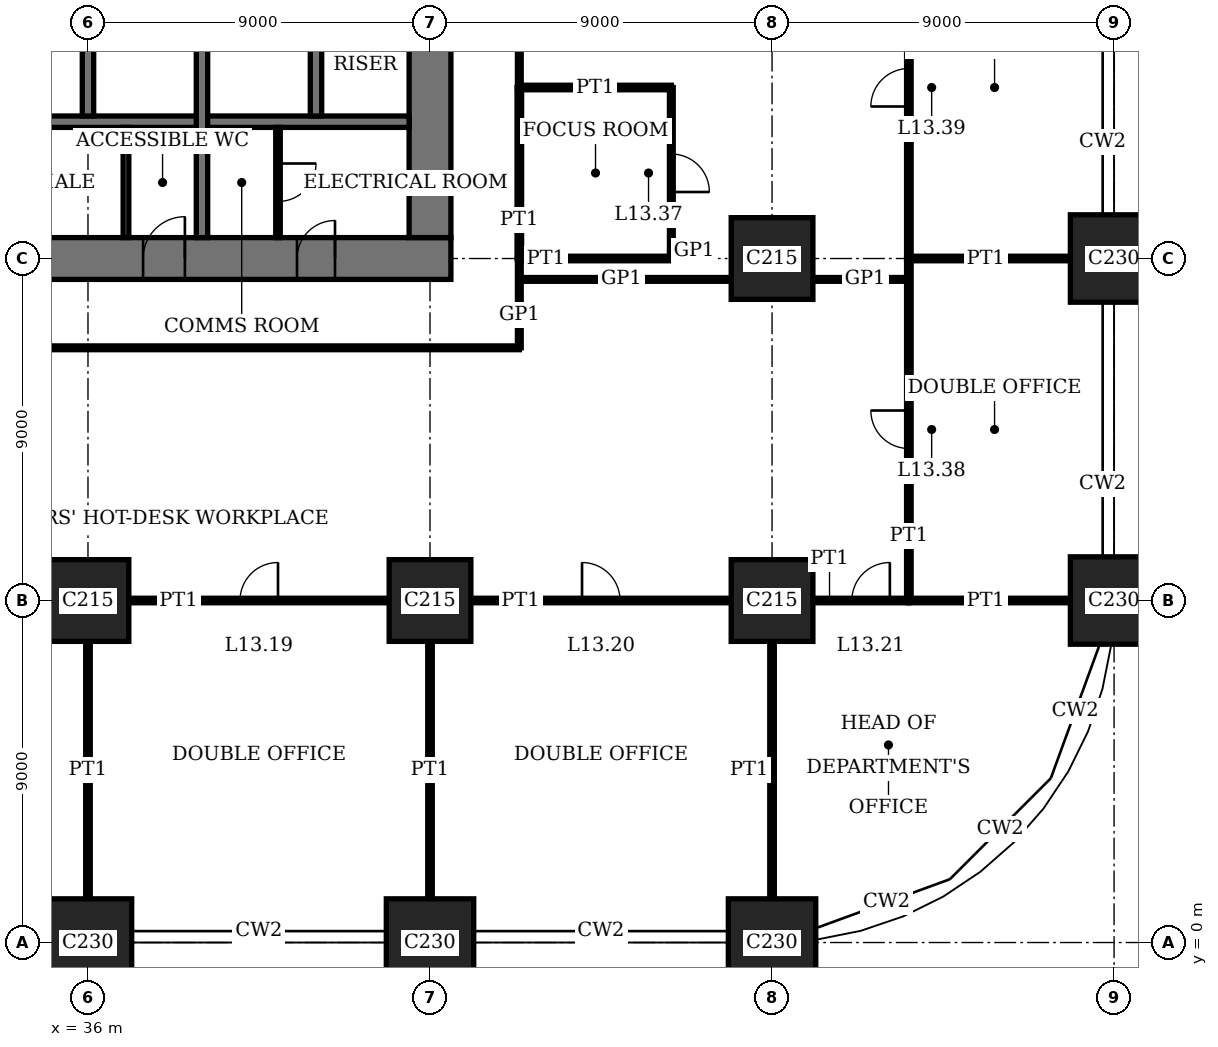
"""IFC4 building model, lengths in metres.
Left out: names, types, materials, properties, quantities, classifications, styles, units other than length and angle.
Written with IfcOpenShell. Run it as: python <this file> out.ifc"""

import sys

from ifc_helpers import new_model, si_unit, direction, frame, frame_2d, origin, origin_2d, place, context, subcontext, project, spatial, rectangle, extrude, element, fill, save


model = new_model("IFC4")
c1 = context("Model", 3, precision=1e-05, world=origin(), true_north=direction((0.0, 1.0)))
c2 = subcontext(c1, "Body", "Model", "MODEL_VIEW")
j1 = project(units=[si_unit("LENGTHUNIT", "METRE"), si_unit("PLANEANGLEUNIT", "RADIAN")], contexts=[c1])
p1 = place(None, origin())
s1 = spatial("IfcSite", under=j1, at=p1, CompositionType="ELEMENT")
p2 = place(p1, origin())
s2 = spatial("IfcBuilding", under=s1, at=p2, CompositionType="ELEMENT")
p3 = place(p2, frame((0.0, 0.0, 55.8)))
s3 = spatial("IfcBuildingStorey", under=s2, at=p3, CompositionType="ELEMENT", Elevation=55.8)
p4 = place(p3, frame((36.0, 0.0, 0.0), z_axis=(0.0, 0.0, 1.0), x_axis=(1.0, 0.0, 0.0)))
e1 = element("IfcColumn", 1, at=p4, inside=s3, PredefinedType="COLUMN", context=c2, shape_type="SweptSolid", body=[
    extrude(rectangle(XDim=2.3, YDim=2.3, at=origin_2d()), origin(), (0.0, 0.0, 1.0), 4.0),
])
p5 = place(p3, frame((36.0, 9.0, 0.0), z_axis=(0.0, 0.0, 1.0), x_axis=(1.0, 0.0, 0.0)))
e2 = element("IfcColumn", 2, at=p5, inside=s3, PredefinedType="COLUMN", context=c2, shape_type="SweptSolid", body=[
    extrude(rectangle(XDim=2.15, YDim=2.15, at=origin_2d()), origin(), (0.0, 0.0, 1.0), 4.0),
])
p6 = place(p3, frame((45.0, 0.0, 0.0), z_axis=(0.0, 0.0, 1.0), x_axis=(1.0, 0.0, 0.0)))
e3 = element("IfcColumn", 3, at=p6, inside=s3, PredefinedType="COLUMN", context=c2, shape_type="SweptSolid", body=[
    extrude(rectangle(XDim=2.3, YDim=2.3, at=origin_2d()), origin(), (0.0, 0.0, 1.0), 4.0),
])
p7 = place(p3, frame((45.0, 9.0, 0.0), z_axis=(0.0, 0.0, 1.0), x_axis=(1.0, 0.0, 0.0)))
e4 = element("IfcColumn", 4, at=p7, inside=s3, PredefinedType="COLUMN", context=c2, shape_type="SweptSolid", body=[
    extrude(rectangle(XDim=2.15, YDim=2.15, at=origin_2d()), origin(), (0.0, 0.0, 1.0), 4.0),
])
p8 = place(p3, frame((54.0, 0.0, 0.0), z_axis=(0.0, 0.0, 1.0), x_axis=(1.0, 0.0, 0.0)))
e5 = element("IfcColumn", 5, at=p8, inside=s3, PredefinedType="COLUMN", context=c2, shape_type="SweptSolid", body=[
    extrude(rectangle(XDim=2.3, YDim=2.3, at=origin_2d()), origin(), (0.0, 0.0, 1.0), 4.0),
])
for number, where, z_axis, x_axis in (
    (6, (54.0, 9.0, 0.0), (0.0, 0.0, 1.0), (1.0, 0.0, 0.0)),
    (7, (54.0, 18.0, 0.0), (0.0, 0.0, 1.0), (1.0, 0.0, 0.0)),
):
    element("IfcColumn", number, at=place(p3, frame(where, z_axis=z_axis, x_axis=x_axis)), inside=s3, PredefinedType="COLUMN", context=c2, shape_type="SweptSolid", body=[
        extrude(rectangle(XDim=2.15, YDim=2.15, at=origin_2d()), origin(), (0.0, 0.0, 1.0), 4.0),
    ])
for number, where, z_axis, x_axis in (
    (8, (63.0, 9.0, 0.0), (0.0, 0.0, 1.0), (1.0, 0.0, 0.0)),
    (9, (63.0, 18.0, 0.0), (0.0, 0.0, 1.0), (1.0, 0.0, 0.0)),
):
    element("IfcColumn", number, at=place(p3, frame(where, z_axis=z_axis, x_axis=x_axis)), inside=s3, PredefinedType="COLUMN", context=c2, shape_type="SweptSolid", body=[
        extrude(rectangle(XDim=2.3, YDim=2.3, at=origin_2d()), origin(), (0.0, 0.0, 1.0), 4.0),
    ])
p9 = place(p3, frame((17.45, 18.0, 0.0), z_axis=(0.0, 0.0, 1.0), x_axis=(1.0, 0.0, 0.0)))
e10 = element("IfcWall", 10, at=p9, inside=s3, PredefinedType="SHEAR", context=c2, shape_type="SweptSolid", body=[
    extrude(rectangle(XDim=28.1, YDim=1.1, at=frame_2d((14.05, 0.0))), origin(), (0.0, 0.0, 1.0), 4.0),
])
p10 = place(p9, frame((11.55, 0.0, 0.0)))
e11 = element("IfcOpeningElement", 11, at=p10, cuts=e10, PredefinedType="OPENING", context=c2, shape_type="SweptSolid", body=[
    extrude(rectangle(XDim=1.0, YDim=2.4, at=frame_2d((0.5, 1.2))), frame((0.0, 0.56, 0.0), z_axis=(0.0, -1.0, 0.0), x_axis=(1.0, 0.0, 0.0)), (0.0, 0.0, 1.0), 1.12),
])
p11 = place(p9, frame((16.55, 0.0, 0.0)))
e12 = element("IfcOpeningElement", 12, at=p11, cuts=e10, PredefinedType="OPENING", context=c2, shape_type="SweptSolid", body=[
    extrude(rectangle(XDim=1.0, YDim=2.4, at=frame_2d((0.5, 1.2))), frame((0.0, 0.56, 0.0), z_axis=(0.0, -1.0, 0.0), x_axis=(1.0, 0.0, 0.0)), (0.0, 0.0, 1.0), 1.12),
])
p12 = place(p9, frame((20.0, 0.0, 0.0)))
e13 = element("IfcOpeningElement", 13, at=p12, cuts=e10, PredefinedType="OPENING", context=c2, shape_type="SweptSolid", body=[
    extrude(rectangle(XDim=1.1, YDim=2.4, at=frame_2d((0.55, 1.2))), frame((0.0, 0.56, 0.0), z_axis=(0.0, -1.0, 0.0), x_axis=(1.0, 0.0, 0.0)), (0.0, 0.0, 1.0), 1.12),
])
p13 = place(p9, frame((24.05, 0.0, 0.0)))
e14 = element("IfcOpeningElement", 14, at=p13, cuts=e10, PredefinedType="OPENING", context=c2, shape_type="SweptSolid", body=[
    extrude(rectangle(XDim=1.0, YDim=2.4, at=frame_2d((0.5, 1.2))), frame((0.0, 0.56, 0.0), z_axis=(0.0, -1.0, 0.0), x_axis=(1.0, 0.0, 0.0)), (0.0, 0.0, 1.0), 1.12),
])
p14 = place(p3, frame((45.0, 18.55, 0.0), z_axis=(0.0, 0.0, 1.0), x_axis=(0.0, 1.0, 0.0)))
e15 = element("IfcWall", 15, at=p14, inside=s3, PredefinedType="SHEAR", context=c2, shape_type="SweptSolid", body=[
    extrude(rectangle(XDim=16.9, YDim=1.1, at=frame_2d((8.45, 0.0))), origin(), (0.0, 0.0, 1.0), 4.0),
])
p15 = place(p14, frame((8.45, 0.0, 0.0)))
e16 = element("IfcOpeningElement", 16, at=p15, cuts=e15, PredefinedType="OPENING", context=c2, shape_type="SweptSolid", body=[
    extrude(rectangle(XDim=1.8, YDim=2.4, at=frame_2d((0.9, 1.2))), frame((0.0, 0.56, 0.0), z_axis=(0.0, -1.0, 0.0), x_axis=(1.0, 0.0, 0.0)), (0.0, 0.0, 1.0), 1.12),
])
p16 = place(p3, frame((27.15, 21.6, 0.0), z_axis=(0.0, 0.0, 1.0), x_axis=(1.0, 0.0, 0.0)))
e17 = element("IfcWall", 17, at=p16, inside=s3, PredefinedType="SHEAR", context=c2, shape_type="SweptSolid", body=[
    extrude(rectangle(XDim=17.3, YDim=0.3, at=frame_2d((8.65, 0.0))), origin(), (0.0, 0.0, 1.0), 4.0),
])
p17 = place(p3, frame((36.0, 21.75, 0.0), z_axis=(0.0, 0.0, 1.0), x_axis=(0.0, 1.0, 0.0)))
e18 = element("IfcWall", 18, at=p17, inside=s3, PredefinedType="SHEAR", context=c2, shape_type="SweptSolid", body=[
    extrude(rectangle(XDim=2.7, YDim=0.3, at=frame_2d((1.35, 0.0))), origin(), (0.0, 0.0, 1.0), 4.0),
])
p18 = place(p3, frame((39.0, 18.55, 0.0), z_axis=(0.0, 0.0, 1.0), x_axis=(0.0, 1.0, 0.0)))
e19 = element("IfcWall", 19, at=p18, inside=s3, PredefinedType="SHEAR", context=c2, shape_type="SweptSolid", body=[
    extrude(rectangle(XDim=5.9, YDim=0.3, at=frame_2d((2.95, 0.0))), origin(), (0.0, 0.0, 1.0), 4.0),
])
p19 = place(p3, frame((42.0, 21.75, 0.0), z_axis=(0.0, 0.0, 1.0), x_axis=(0.0, 1.0, 0.0)))
e20 = element("IfcWall", 20, at=p19, inside=s3, PredefinedType="SHEAR", context=c2, shape_type="SweptSolid", body=[
    extrude(rectangle(XDim=2.7, YDim=0.3, at=frame_2d((1.35, 0.0))), origin(), (0.0, 0.0, 1.0), 4.0),
])
p20 = place(p3, frame((37.075, 9.0, 0.0), z_axis=(0.0, 0.0, 1.0), x_axis=(1.0, 0.0, 0.0)))
e21 = element("IfcWall", 21, at=p20, inside=s3, PredefinedType="PARTITIONING", context=c2, shape_type="SweptSolid", body=[
    extrude(rectangle(XDim=6.85, YDim=0.12, at=frame_2d((3.425, 0.0))), origin(), (0.0, 0.0, 1.0), 3.05),
])
p21 = place(p20, frame((2.925, 0.0, 0.0)))
e22 = element("IfcOpeningElement", 22, at=p21, cuts=e21, PredefinedType="OPENING", context=c2, shape_type="SweptSolid", body=[
    extrude(rectangle(XDim=1.0, YDim=2.4, at=frame_2d((0.5, 1.2))), frame((0.0, 0.07, 0.0), z_axis=(0.0, -1.0, 0.0), x_axis=(1.0, 0.0, 0.0)), (0.0, 0.0, 1.0), 0.14),
])
p22 = place(p3, frame((46.075, 9.0, 0.0), z_axis=(0.0, 0.0, 1.0), x_axis=(1.0, 0.0, 0.0)))
e23 = element("IfcWall", 23, at=p22, inside=s3, PredefinedType="PARTITIONING", context=c2, shape_type="SweptSolid", body=[
    extrude(rectangle(XDim=6.85, YDim=0.12, at=frame_2d((3.425, 0.0))), origin(), (0.0, 0.0, 1.0), 3.05),
])
p23 = place(p22, frame((2.925, 0.0, 0.0)))
e24 = element("IfcOpeningElement", 24, at=p23, cuts=e23, PredefinedType="OPENING", context=c2, shape_type="SweptSolid", body=[
    extrude(rectangle(XDim=1.0, YDim=2.4, at=frame_2d((0.5, 1.2))), frame((0.0, 0.07, 0.0), z_axis=(0.0, -1.0, 0.0), x_axis=(1.0, 0.0, 0.0)), (0.0, 0.0, 1.0), 0.14),
])
p24 = place(p3, frame((57.6, 9.0, 0.0), z_axis=(0.0, 0.0, 1.0), x_axis=(1.0, 0.0, 0.0)))
e25 = element("IfcWall", 25, at=p24, inside=s3, PredefinedType="PARTITIONING", context=c2, shape_type="SweptSolid", body=[
    extrude(rectangle(XDim=4.25, YDim=0.12, at=frame_2d((2.125, 0.0))), origin(), (0.0, 0.0, 1.0), 3.05),
])
p25 = place(p3, frame((55.075, 9.0, 0.0), z_axis=(0.0, 0.0, 1.0), x_axis=(1.0, 0.0, 0.0)))
e26 = element("IfcWall", 26, at=p25, inside=s3, PredefinedType="PARTITIONING", context=c2, shape_type="SweptSolid", body=[
    extrude(rectangle(XDim=2.525, YDim=0.12, at=frame_2d((1.263, 0.0))), origin(), (0.0, 0.0, 1.0), 3.05),
])
p26 = place(p25, frame((1.025, 0.0, 0.0)))
e27 = element("IfcOpeningElement", 27, at=p26, cuts=e26, PredefinedType="OPENING", context=c2, shape_type="SweptSolid", body=[
    extrude(rectangle(XDim=1.0, YDim=2.4, at=frame_2d((0.5, 1.2))), frame((0.0, 0.07, 0.0), z_axis=(0.0, -1.0, 0.0), x_axis=(1.0, 0.0, 0.0)), (0.0, 0.0, 1.0), 0.14),
])
p27 = place(p3, frame((31.5, 15.65, 0.0), z_axis=(0.0, 0.0, 1.0), x_axis=(1.0, 0.0, 0.0)))
e28 = element("IfcWall", 28, at=p27, inside=s3, PredefinedType="PARTITIONING", context=c2, shape_type="SweptSolid", body=[
    extrude(rectangle(XDim=15.85, YDim=0.1, at=frame_2d((7.925, 0.0))), origin(), (0.0, 0.0, 1.0), 3.75),
])
p28 = place(p3, frame((47.35, 17.45, 0.0), z_axis=(0.0, 0.0, 1.0), x_axis=(1.0, 0.0, 0.0)))
e29 = element("IfcWall", 29, at=p28, inside=s3, PredefinedType="PARTITIONING", context=c2, shape_type="SweptSolid", body=[
    extrude(rectangle(XDim=5.575, YDim=0.1, at=frame_2d((2.788, 0.0))), origin(), (0.0, 0.0, 1.0), 3.75),
])
p29 = place(p3, frame((55.075, 17.45, 0.0), z_axis=(0.0, 0.0, 1.0), x_axis=(1.0, 0.0, 0.0)))
e30 = element("IfcWall", 30, at=p29, inside=s3, PredefinedType="PARTITIONING", context=c2, shape_type="SweptSolid", body=[
    extrude(rectangle(XDim=2.535, YDim=0.1, at=frame_2d((1.268, 0.0))), origin(), (0.0, 0.0, 1.0), 3.75),
])
p30 = place(p3, frame((57.6, 18.0, 0.0), z_axis=(0.0, 0.0, 1.0), x_axis=(1.0, 0.0, 0.0)))
e31 = element("IfcWall", 31, at=p30, inside=s3, PredefinedType="PARTITIONING", context=c2, shape_type="SweptSolid", body=[
    extrude(rectangle(XDim=4.25, YDim=0.12, at=frame_2d((2.125, 0.0))), origin(), (0.0, 0.0, 1.0), 3.05),
])
p31 = place(p3, frame((47.35, 18.0, 0.0), z_axis=(0.0, 0.0, 1.0), x_axis=(1.0, 0.0, 0.0)))
e32 = element("IfcWall", 32, at=p31, inside=s3, PredefinedType="PARTITIONING", context=c2, shape_type="SweptSolid", body=[
    extrude(rectangle(XDim=4.0, YDim=0.12, at=frame_2d((2.0, 0.0))), origin(), (0.0, 0.0, 1.0), 3.05),
])
p32 = place(p3, frame((47.35, 22.5, 0.0), z_axis=(0.0, 0.0, 1.0), x_axis=(1.0, 0.0, 0.0)))
e33 = element("IfcWall", 33, at=p32, inside=s3, PredefinedType="PARTITIONING", context=c2, shape_type="SweptSolid", body=[
    extrude(rectangle(XDim=4.0, YDim=0.12, at=frame_2d((2.0, 0.0))), origin(), (0.0, 0.0, 1.0), 3.1),
])
for number, where, z_axis, x_axis in (
    (34, (36.0, 1.15, 0.0), (0.0, 0.0, 1.0), (0.0, 1.0, 0.0)),
    (35, (45.0, 1.15, 0.0), (0.0, 0.0, 1.0), (0.0, 1.0, 0.0)),
):
    element("IfcWall", number, at=place(p3, frame(where, z_axis=z_axis, x_axis=x_axis)), inside=s3, PredefinedType="PARTITIONING", context=c2, shape_type="SweptSolid", body=[
        extrude(rectangle(XDim=6.775, YDim=0.12, at=frame_2d((3.388, 0.0))), origin(), (0.0, 0.0, 1.0), 3.05),
    ])
p33 = place(p3, frame((47.35, 18.0, 0.0), z_axis=(0.0, 0.0, 1.0), x_axis=(0.0, 1.0, 0.0)))
e36 = element("IfcWall", 36, at=p33, inside=s3, PredefinedType="PARTITIONING", context=c2, shape_type="SweptSolid", body=[
    extrude(rectangle(XDim=4.5, YDim=0.12, at=frame_2d((2.25, 0.0))), origin(), (0.0, 0.0, 1.0), 3.75),
])
p34 = place(p3, frame((47.35, 15.65, 0.0), z_axis=(0.0, 0.0, 1.0), x_axis=(0.0, 1.0, 0.0)))
e37 = element("IfcWall", 37, at=p34, inside=s3, PredefinedType="PARTITIONING", context=c2, shape_type="SweptSolid", body=[
    extrude(rectangle(XDim=2.35, YDim=0.1, at=frame_2d((1.175, 0.0))), origin(), (0.0, 0.0, 1.0), 3.75),
])
p35 = place(p3, frame((47.35, 22.5, 0.0), z_axis=(0.0, 0.0, 1.0), x_axis=(0.0, 1.0, 0.0)))
e38 = element("IfcWall", 38, at=p35, inside=s3, PredefinedType="PARTITIONING", context=c2, shape_type="SweptSolid", body=[
    extrude(rectangle(XDim=15.85, YDim=0.1, at=frame_2d((7.925, 0.0))), origin(), (0.0, 0.0, 1.0), 3.75),
])
p36 = place(p35, frame((7.425, 0.0, 0.0)))
e39 = element("IfcOpeningElement", 39, at=p36, cuts=e38, PredefinedType="OPENING", context=c2, shape_type="SweptSolid", body=[
    extrude(rectangle(XDim=1.0, YDim=2.4, at=frame_2d((0.5, 1.2))), frame((0.0, 0.06, 0.0), z_axis=(0.0, -1.0, 0.0), x_axis=(1.0, 0.0, 0.0)), (0.0, 0.0, 1.0), 0.12),
])
p37 = place(p3, frame((51.35, 18.0, 0.0), z_axis=(0.0, 0.0, 1.0), x_axis=(0.0, 1.0, 0.0)))
e40 = element("IfcWall", 40, at=p37, inside=s3, PredefinedType="PARTITIONING", context=c2, shape_type="SweptSolid", body=[
    extrude(rectangle(XDim=4.5, YDim=0.1, at=frame_2d((2.25, 0.0))), origin(), (0.0, 0.0, 1.0), 3.75),
])
p38 = place(p37, frame((1.75, 0.0, 0.0)))
e41 = element("IfcOpeningElement", 41, at=p38, cuts=e40, PredefinedType="OPENING", context=c2, shape_type="SweptSolid", body=[
    extrude(rectangle(XDim=1.0, YDim=2.4, at=frame_2d((0.5, 1.2))), frame((0.0, 0.06, 0.0), z_axis=(0.0, -1.0, 0.0), x_axis=(1.0, 0.0, 0.0)), (0.0, 0.0, 1.0), 0.12),
])
p39 = place(p3, frame((54.0, 1.15, 0.0), z_axis=(0.0, 0.0, 1.0), x_axis=(0.0, 1.0, 0.0)))
e42 = element("IfcWall", 42, at=p39, inside=s3, PredefinedType="PARTITIONING", context=c2, shape_type="SweptSolid", body=[
    extrude(rectangle(XDim=6.775, YDim=0.12, at=frame_2d((3.388, 0.0))), origin(), (0.0, 0.0, 1.0), 3.05),
])
p40 = place(p3, frame((57.6, 9.0, 0.0), z_axis=(0.0, 0.0, 1.0), x_axis=(0.0, 1.0, 0.0)))
e43 = element("IfcWall", 43, at=p40, inside=s3, PredefinedType="PARTITIONING", context=c2, shape_type="SweptSolid", body=[
    extrude(rectangle(XDim=9.0, YDim=0.12, at=frame_2d((4.5, 0.0))), origin(), (0.0, 0.0, 1.0), 3.75),
])
p41 = place(p40, frame((4.0, 0.0, 0.0)))
e44 = element("IfcOpeningElement", 44, at=p41, cuts=e43, PredefinedType="OPENING", context=c2, shape_type="SweptSolid", body=[
    extrude(rectangle(XDim=1.0, YDim=2.4, at=frame_2d((0.5, 1.2))), frame((0.0, 0.07, 0.0), z_axis=(0.0, -1.0, 0.0), x_axis=(1.0, 0.0, 0.0)), (0.0, 0.0, 1.0), 0.14),
])
p42 = place(p3, frame((57.6, 18.0, 0.0), z_axis=(0.0, 0.0, 1.0), x_axis=(0.0, 1.0, 0.0)))
e45 = element("IfcWall", 45, at=p42, inside=s3, PredefinedType="PARTITIONING", context=c2, shape_type="SweptSolid", body=[
    extrude(rectangle(XDim=9.0, YDim=0.12, at=frame_2d((4.5, 0.0))), origin(), (0.0, 0.0, 1.0), 3.75),
])
p43 = place(p42, frame((4.0, 0.0, 0.0)))
e46 = element("IfcOpeningElement", 46, at=p43, cuts=e45, PredefinedType="OPENING", context=c2, shape_type="SweptSolid", body=[
    extrude(rectangle(XDim=1.0, YDim=2.4, at=frame_2d((0.5, 1.2))), frame((0.0, 0.07, 0.0), z_axis=(0.0, -1.0, 0.0), x_axis=(1.0, 0.0, 0.0)), (0.0, 0.0, 1.0), 0.14),
])
p44 = place(p3, frame((37.0, 18.55, 0.0), z_axis=(0.0, 0.0, 1.0), x_axis=(0.0, 1.0, 0.0)))
e47 = element("IfcWall", 47, at=p44, inside=s3, PredefinedType="PARTITIONING", context=c2, shape_type="SweptSolid", body=[
    extrude(rectangle(XDim=2.9, YDim=0.15, at=frame_2d((1.45, 0.0))), origin(), (0.0, 0.0, 1.0), 3.75),
])
p45 = place(p3, frame((41.0, 18.55, 0.0), z_axis=(0.0, 0.0, 1.0), x_axis=(0.0, 1.0, 0.0)))
e48 = element("IfcWall", 48, at=p45, inside=s3, PredefinedType="PARTITIONING", context=c2, shape_type="SweptSolid", body=[
    extrude(rectangle(XDim=2.9, YDim=0.12, at=frame_2d((1.45, 0.0))), origin(), (0.0, 0.0, 1.0), 3.75),
])
p46 = place(p45, frame((0.95, 0.0, 0.0)))
e49 = element("IfcOpeningElement", 49, at=p46, cuts=e48, PredefinedType="OPENING", context=c2, shape_type="SweptSolid", body=[
    extrude(rectangle(XDim=1.0, YDim=2.4, at=frame_2d((0.5, 1.2))), frame((0.0, 0.07, 0.0), z_axis=(0.0, -1.0, 0.0), x_axis=(1.0, 0.0, 0.0)), (0.0, 0.0, 1.0), 0.14),
])
p47 = place(p12, origin())
e50 = element("IfcDoor", 50, at=p47, inside=s3, OperationType="SINGLE_SWING_LEFT", PredefinedType="DOOR", context=c2, shape_type="SweptSolid", body=[
    extrude(rectangle(XDim=1.1, YDim=2.4, at=frame_2d((0.55, 1.2))), frame((0.0, 0.025, 0.0), z_axis=(0.0, -1.0, 0.0), x_axis=(1.0, 0.0, 0.0)), (0.0, 0.0, 1.0), 0.05),
    extrude(rectangle(XDim=0.04, YDim=2.4, at=frame_2d((0.02, 1.2))), frame((0.0, 0.44, 0.0), z_axis=(0.0, -1.0, 0.0), x_axis=(1.0, 0.0, 0.0)), (0.0, 0.0, 1.0), 0.88),
    extrude(rectangle(XDim=0.04, YDim=2.4, at=frame_2d((1.08, 1.2))), frame((0.0, 0.44, 0.0), z_axis=(0.0, -1.0, 0.0), x_axis=(1.0, 0.0, 0.0)), (0.0, 0.0, 1.0), 0.88),
    extrude(rectangle(XDim=1.1, YDim=0.04, at=frame_2d((0.55, 2.38))), frame((0.0, 0.44, 0.0), z_axis=(0.0, -1.0, 0.0), x_axis=(1.0, 0.0, 0.0)), (0.0, 0.0, 1.0), 0.88),
])
fill(e13, e50)
p48 = place(p13, origin())
e51 = element("IfcDoor", 51, at=p48, inside=s3, OperationType="SINGLE_SWING_LEFT", PredefinedType="DOOR", context=c2, shape_type="SweptSolid", body=[
    extrude(rectangle(XDim=1.0, YDim=2.4, at=frame_2d((0.5, 1.2))), frame((0.0, 0.025, 0.0), z_axis=(0.0, -1.0, 0.0), x_axis=(1.0, 0.0, 0.0)), (0.0, 0.0, 1.0), 0.05),
    extrude(rectangle(XDim=0.04, YDim=2.4, at=frame_2d((0.02, 1.2))), frame((0.0, 0.4, 0.0), z_axis=(0.0, -1.0, 0.0), x_axis=(1.0, 0.0, 0.0)), (0.0, 0.0, 1.0), 0.8),
    extrude(rectangle(XDim=0.04, YDim=2.4, at=frame_2d((0.98, 1.2))), frame((0.0, 0.4, 0.0), z_axis=(0.0, -1.0, 0.0), x_axis=(1.0, 0.0, 0.0)), (0.0, 0.0, 1.0), 0.8),
    extrude(rectangle(XDim=1.0, YDim=0.04, at=frame_2d((0.5, 2.38))), frame((0.0, 0.4, 0.0), z_axis=(0.0, -1.0, 0.0), x_axis=(1.0, 0.0, 0.0)), (0.0, 0.0, 1.0), 0.8),
])
fill(e14, e51)
p49 = place(p21, origin())
e52 = element("IfcDoor", 52, at=p49, inside=s3, OperationType="SINGLE_SWING_LEFT", PredefinedType="DOOR", context=c2, shape_type="SweptSolid", body=[
    extrude(rectangle(XDim=1.0, YDim=2.4, at=frame_2d((0.5, 1.2))), frame((0.0, 0.025, 0.0), z_axis=(0.0, -1.0, 0.0), x_axis=(1.0, 0.0, 0.0)), (0.0, 0.0, 1.0), 0.05),
])
fill(e22, e52)
p50 = place(p23, origin())
e53 = element("IfcDoor", 53, at=p50, inside=s3, OperationType="SINGLE_SWING_RIGHT", PredefinedType="DOOR", context=c2, shape_type="SweptSolid", body=[
    extrude(rectangle(XDim=1.0, YDim=2.4, at=frame_2d((0.5, 1.2))), frame((0.0, 0.025, 0.0), z_axis=(0.0, -1.0, 0.0), x_axis=(1.0, 0.0, 0.0)), (0.0, 0.0, 1.0), 0.05),
])
fill(e24, e53)
p51 = place(p26, origin())
e54 = element("IfcDoor", 54, at=p51, inside=s3, OperationType="SINGLE_SWING_LEFT", PredefinedType="DOOR", context=c2, shape_type="SweptSolid", body=[
    extrude(rectangle(XDim=1.0, YDim=2.4, at=frame_2d((0.5, 1.2))), frame((0.0, 0.025, 0.0), z_axis=(0.0, -1.0, 0.0), x_axis=(1.0, 0.0, 0.0)), (0.0, 0.0, 1.0), 0.05),
])
fill(e27, e54)
p52 = place(p38, origin())
e55 = element("IfcDoor", 55, at=p52, inside=s3, OperationType="SINGLE_SWING_LEFT", PredefinedType="DOOR", context=c2, shape_type="SweptSolid", body=[
    extrude(rectangle(XDim=1.0, YDim=2.4, at=frame_2d((0.5, 1.2))), frame((0.0, 0.02, 0.0), z_axis=(0.0, -1.0, 0.0), x_axis=(1.0, 0.0, 0.0)), (0.0, 0.0, 1.0), 0.04),
])
fill(e41, e55)
p53 = place(p41, origin())
e56 = element("IfcDoor", 56, at=p53, inside=s3, OperationType="SINGLE_SWING_LEFT", PredefinedType="DOOR", context=c2, shape_type="SweptSolid", body=[
    extrude(rectangle(XDim=1.0, YDim=2.4, at=frame_2d((0.5, 1.2))), frame((0.0, 0.025, 0.0), z_axis=(0.0, -1.0, 0.0), x_axis=(1.0, 0.0, 0.0)), (0.0, 0.0, 1.0), 0.05),
])
fill(e44, e56)
p54 = place(p43, origin())
e57 = element("IfcDoor", 57, at=p54, inside=s3, OperationType="SINGLE_SWING_RIGHT", PredefinedType="DOOR", context=c2, shape_type="SweptSolid", body=[
    extrude(rectangle(XDim=1.0, YDim=2.4, at=frame_2d((0.5, 1.2))), frame((0.0, 0.025, 0.0), z_axis=(0.0, -1.0, 0.0), x_axis=(1.0, 0.0, 0.0)), (0.0, 0.0, 1.0), 0.05),
])
fill(e46, e57)
p55 = place(p46, origin())
e58 = element("IfcDoor", 58, at=p55, inside=s3, OperationType="SINGLE_SWING_RIGHT", PredefinedType="DOOR", context=c2, shape_type="SweptSolid", body=[
    extrude(rectangle(XDim=1.0, YDim=2.4, at=frame_2d((0.5, 1.2))), frame((0.0, 0.03, 0.0), z_axis=(0.0, -1.0, 0.0), x_axis=(1.0, 0.0, 0.0)), (0.0, 0.0, 1.0), 0.06),
])
fill(e49, e58)
save(model, sys.argv[1])
